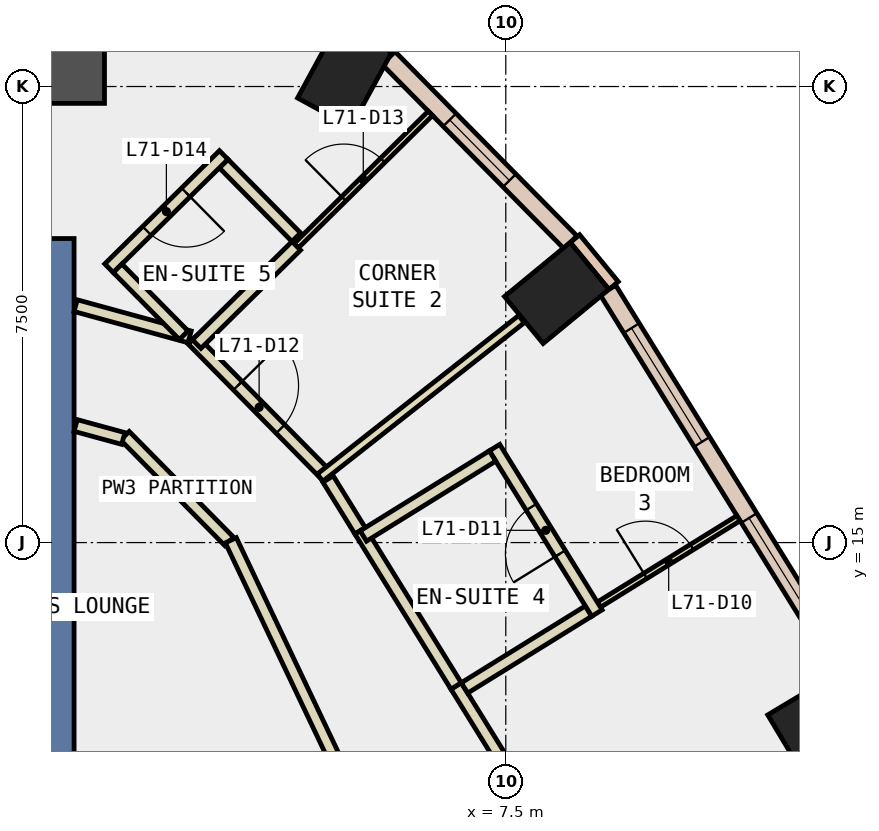
"""IFC4 building model, lengths in metres.
Left out: names, types, materials, properties, quantities, classifications, styles, units other than length and angle.
Written with IfcOpenShell. Run it as: python <this file> out.ifc"""

import sys

from ifc_helpers import new_model, si_unit, direction, frame, frame_2d, origin, origin_2d, place, context, subcontext, project, spatial, rectangle, extrude, element, fill, save


model = new_model("IFC4")
c1 = context("Model", 3, precision=1e-05, world=origin(), true_north=direction((0.0, 1.0)))
c2 = subcontext(c1, "Body", "Model", "MODEL_VIEW")
j1 = project(units=[si_unit("LENGTHUNIT", "METRE"), si_unit("PLANEANGLEUNIT", "RADIAN")], contexts=[c1])
p1 = place(None, origin())
s1 = spatial("IfcSite", under=j1, at=p1, CompositionType="ELEMENT")
p2 = place(p1, origin())
s2 = spatial("IfcBuilding", under=s1, at=p2, CompositionType="ELEMENT")
p3 = place(p2, frame((0.0, 0.0, 304.4)))
s3 = spatial("IfcBuildingStorey", under=s2, at=p3, CompositionType="ELEMENT", Elevation=304.4)
for number, where, z_axis, x_axis in (
    (1, (12.666, 12.097, -0.34), (0.0, 0.0, 1.0), (-0.514, 0.858, 0.0)),
    (2, (8.337, 19.105, -0.34), (0.0, 0.0, 1.0), (-0.636, 0.772, 0.0)),
    (3, (4.85, 22.687, -0.34), (0.0, 0.0, 1.0), (-0.878, 0.479, 0.0)),
):
    element("IfcColumn", number, at=place(p3, frame(where, z_axis=z_axis, x_axis=x_axis)), inside=s3, PredefinedType="COLUMN", context=c2, shape_type="SweptSolid", body=[
        extrude(rectangle(XDim=1.0, YDim=1.4, at=origin_2d()), origin(), (0.0, 0.0, 1.0), 3.6),
    ])
p4 = place(p3, frame((0.0, 23.123, -0.34), z_axis=(0.0, 0.0, 1.0), x_axis=(0.0, 1.0, 0.0)))
e4 = element("IfcColumn", 4, at=p4, inside=s3, PredefinedType="COLUMN", context=c2, shape_type="SweptSolid", body=[
    extrude(rectangle(XDim=1.8, YDim=1.8, at=origin_2d()), origin(), (0.0, 0.0, 1.0), 3.6),
])
p5 = place(p3, frame((0.0, 11.0, -0.34), z_axis=(0.0, 0.0, 1.0), x_axis=(0.0, 1.0, 0.0)))
e5 = element("IfcWall", 5, at=p5, inside=s3, PredefinedType="SHEAR", context=c2, shape_type="SweptSolid", body=[
    extrude(rectangle(XDim=9.0, YDim=0.8, at=frame_2d((4.5, 0.0))), origin(), (0.0, 0.0, 1.0), 3.6),
])
p6 = place(p3, frame((9.273, 19.227, 0.0), z_axis=(0.0, 0.0, 1.0), x_axis=(-0.635852688617, 0.771810441999, 0.0)))
e6 = element("IfcWall", 6, at=p6, inside=s3, PredefinedType="STANDARD", context=c2, shape_type="SweptSolid", body=[
    extrude(rectangle(XDim=1.0, YDim=0.2, at=frame_2d((0.5, 0.0))), origin(), (0.0, 0.0, 1.0), 3.26),
])
p7 = place(p3, frame((13.047, 12.907, 0.0), z_axis=(0.0, 0.0, 1.0), x_axis=(-0.526409529565, 0.850231149267, 0.0)))
e7 = element("IfcWall", 7, at=p7, inside=s3, PredefinedType="STANDARD", context=c2, shape_type="SweptSolid", body=[
    extrude(rectangle(XDim=7.346, YDim=0.3, at=frame_2d((3.673, 0.0))), origin(), (0.0, 0.0, 1.0), 3.26),
])
p8 = place(p7, frame((0.737, 0.0, 0.9)))
e8 = element("IfcOpeningElement", 8, at=p8, cuts=e7, PredefinedType="OPENING", context=c2, shape_type="SweptSolid", body=[
    extrude(rectangle(XDim=2.2, YDim=2.0, at=frame_2d((1.1, 1.0))), frame((0.0, 0.16, 0.0), z_axis=(0.0, -1.0, 0.0), x_axis=(1.0, 0.0, 0.0)), (0.0, 0.0, 1.0), 0.32),
])
p9 = place(p7, frame((4.41, 0.0, 0.9)))
e9 = element("IfcOpeningElement", 9, at=p9, cuts=e7, PredefinedType="OPENING", context=c2, shape_type="SweptSolid", body=[
    extrude(rectangle(XDim=2.2, YDim=2.0, at=frame_2d((1.1, 1.0))), frame((0.0, 0.16, 0.0), z_axis=(0.0, -1.0, 0.0), x_axis=(1.0, 0.0, 0.0)), (0.0, 0.0, 1.0), 0.32),
])
p10 = place(p3, frame((8.564, 19.938, 0.0), z_axis=(0.0, 0.0, 1.0), x_axis=(-0.70250598769, 0.711677832491, 0.0)))
e10 = element("IfcWall", 10, at=p10, inside=s3, PredefinedType="STANDARD", context=c2, shape_type="SweptSolid", body=[
    extrude(rectangle(XDim=4.259, YDim=0.3, at=frame_2d((2.129, 0.0))), origin(), (0.0, 0.0, 1.0), 3.26),
])
p11 = place(p10, frame((1.429, 0.0, 0.9)))
e11 = element("IfcOpeningElement", 11, at=p11, cuts=e10, PredefinedType="OPENING", context=c2, shape_type="SweptSolid", body=[
    extrude(rectangle(XDim=1.4, YDim=2.0, at=frame_2d((0.7, 1.0))), frame((0.0, 0.16, 0.0), z_axis=(0.0, -1.0, 0.0), x_axis=(1.0, 0.0, 0.0)), (0.0, 0.0, 1.0), 0.32),
])
p12 = place(p3, frame((2.951, 15.019, 0.0), z_axis=(0.0, 0.0, 1.0), x_axis=(-0.702341227034, 0.711840432126, 0.0)))
e12 = element("IfcWall", 12, at=p12, inside=s3, PredefinedType="PARTITIONING", context=c2, shape_type="SweptSolid", body=[
    extrude(rectangle(XDim=2.442, YDim=0.2, at=frame_2d((1.221, 0.0))), origin(), (0.0, 0.0, 1.0), 3.26),
])
p13 = place(p3, frame((1.209, 16.712, 0.0), z_axis=(0.0, 0.0, 1.0), x_axis=(-0.964583129746, 0.26377904733, 0.0)))
e13 = element("IfcWall", 13, at=p13, inside=s3, PredefinedType="PARTITIONING", context=c2, shape_type="SweptSolid", body=[
    extrude(rectangle(XDim=0.812, YDim=0.2, at=frame_2d((0.406, 0.0))), origin(), (0.0, 0.0, 1.0), 3.26),
])
p14 = place(p3, frame((6.683, 12.642, 0.0), z_axis=(0.0, 0.0, 1.0), x_axis=(0.526290465295, -0.850304854825, 0.0)))
e14 = element("IfcWall", 14, at=p14, inside=s3, PredefinedType="PARTITIONING", context=c2, shape_type="SweptSolid", body=[
    extrude(rectangle(XDim=3.538, YDim=0.2, at=frame_2d((1.769, 0.0))), origin(), (0.0, 0.0, 1.0), 3.26),
])
p15 = place(p3, frame((4.577, 16.045, 0.0), z_axis=(0.0, 0.0, 1.0), x_axis=(0.526203576349, -0.850358628014, 0.0)))
e15 = element("IfcWall", 15, at=p15, inside=s3, PredefinedType="PARTITIONING", context=c2, shape_type="SweptSolid", body=[
    extrude(rectangle(XDim=1.002, YDim=0.2, at=frame_2d((0.501, 0.0))), origin(), (0.0, 0.0, 1.0), 3.26),
])
p16 = place(p3, frame((5.104, 15.193, 0.0), z_axis=(0.0, 0.0, 1.0), x_axis=(0.526329401671, -0.850280754184, 0.0)))
e16 = element("IfcWall", 16, at=p16, inside=s3, PredefinedType="PARTITIONING", context=c2, shape_type="SweptSolid", body=[
    extrude(rectangle(XDim=3.0, YDim=0.2, at=frame_2d((1.5, 0.0))), origin(), (0.0, 0.0, 1.0), 3.26),
])
p17 = place(p3, frame((2.346, 18.336, 0.0), z_axis=(0.0, 0.0, 1.0), x_axis=(0.702481985573, -0.711701524479, 0.0)))
e17 = element("IfcWall", 17, at=p17, inside=s3, PredefinedType="PARTITIONING", context=c2, shape_type="SweptSolid", body=[
    extrude(rectangle(XDim=3.125, YDim=0.2, at=frame_2d((1.562, 0.0))), origin(), (0.0, 0.0, 1.0), 3.26),
])
p18 = place(p17, frame((1.062, 0.0, 0.0)))
e18 = element("IfcOpeningElement", 18, at=p18, cuts=e17, PredefinedType="OPENING", context=c2, shape_type="SweptSolid", body=[
    extrude(rectangle(XDim=1.0, YDim=2.1, at=frame_2d((0.5, 1.05))), frame((0.0, 0.11, 0.0), z_axis=(0.0, -1.0, 0.0), x_axis=(1.0, 0.0, 0.0)), (0.0, 0.0, 1.0), 0.22),
])
p19 = place(p3, frame((0.426, 18.896, 0.0), z_axis=(0.0, 0.0, 1.0), x_axis=(0.964522741234, -0.263999775838, 0.0)))
e19 = element("IfcWall", 19, at=p19, inside=s3, PredefinedType="PARTITIONING", context=c2, shape_type="SweptSolid", body=[
    extrude(rectangle(XDim=1.943, YDim=0.2, at=frame_2d((0.971, 0.0))), origin(), (0.0, 0.0, 1.0), 3.26),
])
p20 = place(p3, frame((9.031, 13.979, 0.0), z_axis=(0.0, 0.0, 1.0), x_axis=(0.85032680557, 0.526254998768, 0.0)))
e20 = element("IfcWall", 20, at=p20, inside=s3, PredefinedType="PARTITIONING", context=c2, shape_type="SweptSolid", body=[
    extrude(rectangle(XDim=2.7, YDim=0.1, at=frame_2d((1.35, 0.0))), origin(), (0.0, 0.0, 1.0), 3.26),
])
p21 = place(p20, frame((0.9, 0.0, 0.0)))
e21 = element("IfcOpeningElement", 21, at=p21, cuts=e20, PredefinedType="OPENING", context=c2, shape_type="SweptSolid", body=[
    extrude(rectangle(XDim=0.9, YDim=2.1, at=frame_2d((0.45, 1.05))), frame((0.0, 0.06, 0.0), z_axis=(0.0, -1.0, 0.0), x_axis=(1.0, 0.0, 0.0)), (0.0, 0.0, 1.0), 0.12),
])
p22 = place(p3, frame((6.821, 12.61, 0.0), z_axis=(0.0, 0.0, 1.0), x_axis=(0.850254303895, 0.526372129494, 0.0)))
e22 = element("IfcWall", 22, at=p22, inside=s3, PredefinedType="PARTITIONING", context=c2, shape_type="SweptSolid", body=[
    extrude(rectangle(XDim=2.399, YDim=0.2, at=frame_2d((1.2, 0.0))), origin(), (0.0, 0.0, 1.0), 3.26),
])
p23 = place(p3, frame((8.999, 13.841, 0.0), z_axis=(0.0, 0.0, 1.0), x_axis=(-0.526283695852, 0.850309044689, 0.0)))
e23 = element("IfcWall", 23, at=p23, inside=s3, PredefinedType="PARTITIONING", context=c2, shape_type="SweptSolid", body=[
    extrude(rectangle(XDim=3.2, YDim=0.2, at=frame_2d((1.6, 0.0))), origin(), (0.0, 0.0, 1.0), 3.26),
])
p24 = place(p23, frame((1.15, 0.0, 0.0)))
e24 = element("IfcOpeningElement", 24, at=p24, cuts=e23, PredefinedType="OPENING", context=c2, shape_type="SweptSolid", body=[
    extrude(rectangle(XDim=0.9, YDim=2.1, at=frame_2d((0.45, 1.05))), frame((0.0, 0.11, 0.0), z_axis=(0.0, -1.0, 0.0), x_axis=(1.0, 0.0, 0.0)), (0.0, 0.0, 1.0), 0.22),
])
p25 = place(p3, frame((7.282, 16.424, 0.0), z_axis=(0.0, 0.0, 1.0), x_axis=(-0.850142312258, -0.526552987751, 0.0)))
e25 = element("IfcWall", 25, at=p25, inside=s3, PredefinedType="PARTITIONING", context=c2, shape_type="SweptSolid", body=[
    extrude(rectangle(XDim=2.5, YDim=0.2, at=frame_2d((1.25, 0.0))), origin(), (0.0, 0.0, 1.0), 3.26),
])
p26 = place(p3, frame((4.445, 16.068, 0.0), z_axis=(0.0, 0.0, 1.0), x_axis=(0.785872006963, 0.618389188677, 0.0)))
e26 = element("IfcWall", 26, at=p26, inside=s3, PredefinedType="PARTITIONING", context=c2, shape_type="SweptSolid", body=[
    extrude(rectangle(XDim=4.216, YDim=0.15, at=frame_2d((2.108, 0.0))), origin(), (0.0, 0.0, 1.0), 3.26),
])
p27 = place(p3, frame((4.053, 19.881, 0.0), z_axis=(0.0, 0.0, 1.0), x_axis=(0.711776071152, 0.702406452516, 0.0)))
e27 = element("IfcWall", 27, at=p27, inside=s3, PredefinedType="PARTITIONING", context=c2, shape_type="SweptSolid", body=[
    extrude(rectangle(XDim=3.101, YDim=0.1, at=frame_2d((1.55, 0.0))), origin(), (0.0, 0.0, 1.0), 3.26),
])
p28 = place(p27, frame((1.1, 0.0, 0.0)))
e28 = element("IfcOpeningElement", 28, at=p28, cuts=e27, PredefinedType="OPENING", context=c2, shape_type="SweptSolid", body=[
    extrude(rectangle(XDim=0.9, YDim=2.1, at=frame_2d((0.45, 1.05))), frame((0.0, 0.06, 0.0), z_axis=(0.0, -1.0, 0.0), x_axis=(1.0, 0.0, 0.0)), (0.0, 0.0, 1.0), 0.12),
])
p29 = place(p3, frame((2.416, 18.265, 0.0), z_axis=(0.0, 0.0, 1.0), x_axis=(0.71207765541, 0.702100714047, 0.0)))
e29 = element("IfcWall", 29, at=p29, inside=s3, PredefinedType="PARTITIONING", context=c2, shape_type="SweptSolid", body=[
    extrude(rectangle(XDim=2.3, YDim=0.2, at=frame_2d((1.15, 0.0))), origin(), (0.0, 0.0, 1.0), 3.26),
])
p30 = place(p3, frame((4.054, 20.022, 0.0), z_axis=(0.0, 0.0, 1.0), x_axis=(-0.702351102688, 0.711830688123, 0.0)))
e30 = element("IfcWall", 30, at=p30, inside=s3, PredefinedType="PARTITIONING", context=c2, shape_type="SweptSolid", body=[
    extrude(rectangle(XDim=1.7, YDim=0.2, at=frame_2d((0.85, 0.0))), origin(), (0.0, 0.0, 1.0), 3.26),
])
p31 = place(p3, frame((2.861, 21.374, 0.0), z_axis=(0.0, 0.0, 1.0), x_axis=(-0.711606122075, -0.702578626934, 0.0)))
e31 = element("IfcWall", 31, at=p31, inside=s3, PredefinedType="PARTITIONING", context=c2, shape_type="SweptSolid", body=[
    extrude(rectangle(XDim=2.65, YDim=0.2, at=frame_2d((1.325, 0.0))), origin(), (0.0, 0.0, 1.0), 3.26),
])
p32 = place(p31, frame((0.875, 0.0, 0.0)))
e32 = element("IfcOpeningElement", 32, at=p32, cuts=e31, PredefinedType="OPENING", context=c2, shape_type="SweptSolid", body=[
    extrude(rectangle(XDim=0.9, YDim=2.1, at=frame_2d((0.45, 1.05))), frame((0.0, 0.11, 0.0), z_axis=(0.0, -1.0, 0.0), x_axis=(1.0, 0.0, 0.0)), (0.0, 0.0, 1.0), 0.22),
])
p33 = place(p3, frame((1.116, 19.511, 0.0), z_axis=(0.0, 0.0, 1.0), x_axis=(0.702515837086, -0.711668109896, 0.0)))
e33 = element("IfcWall", 33, at=p33, inside=s3, PredefinedType="PARTITIONING", context=c2, shape_type="SweptSolid", body=[
    extrude(rectangle(XDim=1.547, YDim=0.2, at=frame_2d((0.773, 0.0))), origin(), (0.0, 0.0, 1.0), 3.26),
])
p34 = place(p3, frame((4.822, 11.156, 0.0), z_axis=(0.0, 0.0, 1.0), x_axis=(-0.429057973289, 0.903276953961, 0.0)))
e34 = element("IfcWall", 34, at=p34, inside=s3, PredefinedType="PARTITIONING", context=c2, shape_type="SweptSolid", body=[
    extrude(rectangle(XDim=4.298, YDim=0.2, at=frame_2d((2.149, 0.0))), origin(), (0.0, 0.0, 1.0), 3.26),
])
p35 = place(p8, origin())
e35 = element("IfcWindow", 35, at=p35, inside=s3, PartitioningType="SINGLE_PANEL", PredefinedType="WINDOW", context=c2, shape_type="SweptSolid", body=[
    extrude(rectangle(XDim=2.2, YDim=2.0, at=frame_2d((1.1, 1.0))), frame((0.0, 0.03, 0.0), z_axis=(0.0, -1.0, 0.0), x_axis=(1.0, 0.0, 0.0)), (0.0, 0.0, 1.0), 0.06),
])
fill(e8, e35)
p36 = place(p9, origin())
e36 = element("IfcWindow", 36, at=p36, inside=s3, PartitioningType="SINGLE_PANEL", PredefinedType="WINDOW", context=c2, shape_type="SweptSolid", body=[
    extrude(rectangle(XDim=2.2, YDim=2.0, at=frame_2d((1.1, 1.0))), frame((0.0, 0.03, 0.0), z_axis=(0.0, -1.0, 0.0), x_axis=(1.0, 0.0, 0.0)), (0.0, 0.0, 1.0), 0.06),
])
fill(e9, e36)
p37 = place(p11, origin())
e37 = element("IfcWindow", 37, at=p37, inside=s3, PartitioningType="SINGLE_PANEL", PredefinedType="WINDOW", context=c2, shape_type="SweptSolid", body=[
    extrude(rectangle(XDim=1.4, YDim=2.0, at=frame_2d((0.7, 1.0))), frame((0.0, 0.03, 0.0), z_axis=(0.0, -1.0, 0.0), x_axis=(1.0, 0.0, 0.0)), (0.0, 0.0, 1.0), 0.06),
])
fill(e11, e37)
p38 = place(p21, origin())
e38 = element("IfcDoor", 38, at=p38, inside=s3, OperationType="SINGLE_SWING_LEFT", PredefinedType="DOOR", context=c2, shape_type="SweptSolid", body=[
    extrude(rectangle(XDim=0.9, YDim=2.1, at=frame_2d((0.45, 1.05))), frame((0.0, 0.025, 0.0), z_axis=(0.0, -1.0, 0.0), x_axis=(1.0, 0.0, 0.0)), (0.0, 0.0, 1.0), 0.05),
])
fill(e21, e38)
p39 = place(p24, origin())
e39 = element("IfcDoor", 39, at=p39, inside=s3, OperationType="SINGLE_SWING_RIGHT", PredefinedType="DOOR", context=c2, shape_type="SweptSolid", body=[
    extrude(rectangle(XDim=0.9, YDim=2.1, at=frame_2d((0.45, 1.05))), frame((0.0, 0.025, 0.0), z_axis=(0.0, -1.0, 0.0), x_axis=(1.0, 0.0, 0.0)), (0.0, 0.0, 1.0), 0.05),
])
fill(e24, e39)
p40 = place(p18, origin())
e40 = element("IfcDoor", 40, at=p40, inside=s3, OperationType="SINGLE_SWING_LEFT", PredefinedType="DOOR", context=c2, shape_type="SweptSolid", body=[
    extrude(rectangle(XDim=1.0, YDim=2.1, at=frame_2d((0.5, 1.05))), frame((0.0, 0.025, 0.0), z_axis=(0.0, -1.0, 0.0), x_axis=(1.0, 0.0, 0.0)), (0.0, 0.0, 1.0), 0.05),
])
fill(e18, e40)
p41 = place(p28, origin())
e41 = element("IfcDoor", 41, at=p41, inside=s3, OperationType="SINGLE_SWING_LEFT", PredefinedType="DOOR", context=c2, shape_type="SweptSolid", body=[
    extrude(rectangle(XDim=0.9, YDim=2.1, at=frame_2d((0.45, 1.05))), frame((0.0, 0.025, 0.0), z_axis=(0.0, -1.0, 0.0), x_axis=(1.0, 0.0, 0.0)), (0.0, 0.0, 1.0), 0.05),
])
fill(e28, e41)
p42 = place(p32, origin())
e42 = element("IfcDoor", 42, at=p42, inside=s3, OperationType="SINGLE_SWING_LEFT", PredefinedType="DOOR", context=c2, shape_type="SweptSolid", body=[
    extrude(rectangle(XDim=0.9, YDim=2.1, at=frame_2d((0.45, 1.05))), frame((0.0, 0.025, 0.0), z_axis=(0.0, -1.0, 0.0), x_axis=(1.0, 0.0, 0.0)), (0.0, 0.0, 1.0), 0.05),
])
fill(e32, e42)
save(model, sys.argv[1])
